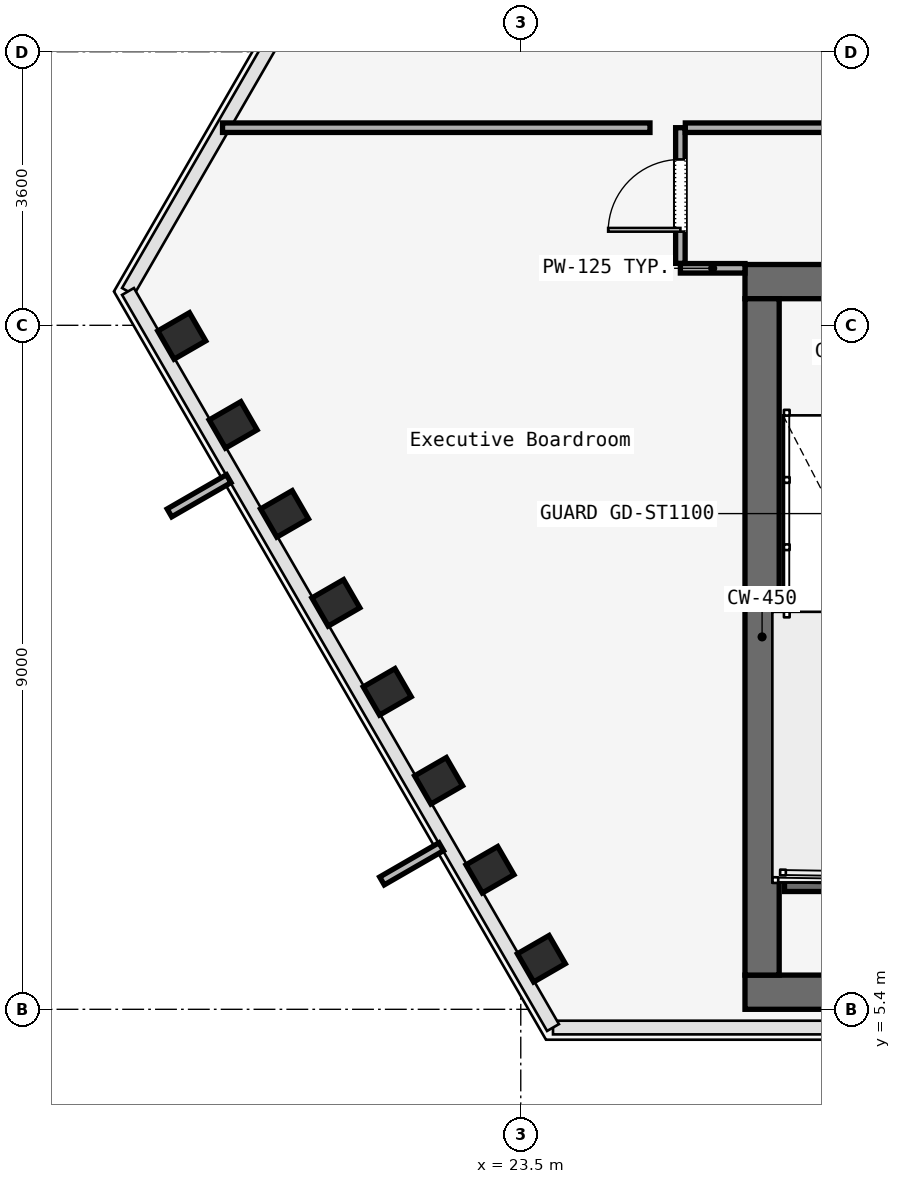
"""IFC4 building model, lengths in metres.
Left out: names, types, materials, properties, quantities, classifications, styles, units other than length and angle.
Written with IfcOpenShell. Run it as: python <this file> out.ifc"""

import sys

from ifc_helpers import new_model, si_unit, direction, frame, frame_2d, origin, origin_2d, place, context, subcontext, project, spatial, rectangle, i_section, extrude, element, fill, save


model = new_model("IFC4")
c1 = context("Model", 3, precision=1e-05, world=origin(), true_north=direction((0.0, 1.0)))
c2 = subcontext(c1, "Body", "Model", "MODEL_VIEW")
j1 = project(units=[si_unit("LENGTHUNIT", "METRE"), si_unit("PLANEANGLEUNIT", "RADIAN")], contexts=[c1])
p1 = place(None, origin())
s1 = spatial("IfcSite", under=j1, at=p1, CompositionType="ELEMENT")
p2 = place(p1, origin())
s2 = spatial("IfcBuilding", under=s1, at=p2, CompositionType="ELEMENT")
p3 = place(p2, frame((0.0, 0.0, 157.4)))
s3 = spatial("IfcBuildingStorey", under=s2, at=p3, CompositionType="ELEMENT", Elevation=157.4)
p4 = place(p3, frame((26.45, 14.975, 0.0), z_axis=(0.0, 0.0, 1.0), x_axis=(1.0, 0.0, 0.0)))
e1 = element("IfcWall", 1, at=p4, inside=s3, PredefinedType="SOLIDWALL", context=c2, shape_type="SweptSolid", body=[
    extrude(rectangle(XDim=31.1, YDim=0.45, at=frame_2d((15.55, 0.0))), origin(), (0.0, 0.0, 1.0), 3.58),
])
p5 = place(p4, frame((1.65, 0.0, 0.0)))
e2 = element("IfcOpeningElement", 2, at=p5, cuts=e1, PredefinedType="OPENING", context=c2, shape_type="SweptSolid", body=[
    extrude(rectangle(XDim=1.1, YDim=2.2, at=frame_2d((0.55, 1.1))), frame((0.0, 0.225, 0.0), z_axis=(0.0, -1.0, 0.0), x_axis=(1.0, 0.0, 0.0)), (0.0, 0.0, 1.0), 0.45),
])
p6 = place(p4, frame((13.65, 0.0, 0.0)))
e3 = element("IfcOpeningElement", 3, at=p6, cuts=e1, PredefinedType="OPENING", context=c2, shape_type="SweptSolid", body=[
    extrude(rectangle(XDim=1.1, YDim=2.2, at=frame_2d((0.55, 1.1))), frame((0.0, 0.225, 0.0), z_axis=(0.0, -1.0, 0.0), x_axis=(1.0, 0.0, 0.0)), (0.0, 0.0, 1.0), 0.45),
])
p7 = place(p4, frame((25.55, 0.0, 0.0)))
e4 = element("IfcOpeningElement", 4, at=p7, cuts=e1, PredefinedType="OPENING", context=c2, shape_type="SweptSolid", body=[
    extrude(rectangle(XDim=1.1, YDim=2.2, at=frame_2d((0.55, 1.1))), frame((0.0, 0.225, 0.0), z_axis=(0.0, -1.0, 0.0), x_axis=(1.0, 0.0, 0.0)), (0.0, 0.0, 1.0), 0.45),
])
p8 = place(p4, frame((10.7, 0.0, 0.0)))
e5 = element("IfcOpeningElement", 5, at=p8, cuts=e1, PredefinedType="OPENING", context=c2, shape_type="SweptSolid", body=[
    extrude(rectangle(XDim=1.4, YDim=2.2, at=frame_2d((0.7, 1.1))), frame((0.0, 0.225, 0.0), z_axis=(0.0, -1.0, 0.0), x_axis=(1.0, 0.0, 0.0)), (0.0, 0.0, 1.0), 0.45),
])
p9 = place(p4, frame((19.35, 0.0, 0.0)))
e6 = element("IfcOpeningElement", 6, at=p9, cuts=e1, PredefinedType="OPENING", context=c2, shape_type="SweptSolid", body=[
    extrude(rectangle(XDim=1.1, YDim=2.2, at=frame_2d((0.55, 1.1))), frame((0.0, 0.225, 0.0), z_axis=(0.0, -1.0, 0.0), x_axis=(1.0, 0.0, 0.0)), (0.0, 0.0, 1.0), 0.45),
])
p10 = place(p4, frame((21.4, 0.0, 0.0)))
e7 = element("IfcOpeningElement", 7, at=p10, cuts=e1, PredefinedType="OPENING", context=c2, shape_type="SweptSolid", body=[
    extrude(rectangle(XDim=0.9, YDim=2.1, at=frame_2d((0.45, 1.05))), frame((0.0, 0.225, 0.0), z_axis=(0.0, -1.0, 0.0), x_axis=(1.0, 0.0, 0.0)), (0.0, 0.0, 1.0), 0.45),
])
p11 = place(p4, frame((23.35, 0.0, 0.0)))
e8 = element("IfcOpeningElement", 8, at=p11, cuts=e1, PredefinedType="OPENING", context=c2, shape_type="SweptSolid", body=[
    extrude(rectangle(XDim=1.3, YDim=2.3, at=frame_2d((0.65, 1.15))), frame((0.0, 0.225, 0.0), z_axis=(0.0, -1.0, 0.0), x_axis=(1.0, 0.0, 0.0)), (0.0, 0.0, 1.0), 0.45),
])
p12 = place(p3, frame((26.45, 5.625, 0.0), z_axis=(0.0, 0.0, 1.0), x_axis=(1.0, 0.0, 0.0)))
e9 = element("IfcWall", 9, at=p12, inside=s3, PredefinedType="SOLIDWALL", context=c2, shape_type="SweptSolid", body=[
    extrude(rectangle(XDim=31.1, YDim=0.45, at=frame_2d((15.55, 0.0))), origin(), (0.0, 0.0, 1.0), 3.58),
])
p13 = place(p3, frame((26.675, 5.85, 0.0), z_axis=(0.0, 0.0, 1.0), x_axis=(0.0, 1.0, 0.0)))
e10 = element("IfcWall", 10, at=p13, inside=s3, PredefinedType="SOLIDWALL", context=c2, shape_type="SweptSolid", body=[
    extrude(rectangle(XDim=8.9, YDim=0.45, at=frame_2d((4.45, 0.0))), origin(), (0.0, 0.0, 1.0), 3.58),
])
p14 = place(p3, frame((19.04, 14.26, 0.0), z_axis=(-0.012644712092, -0.129016634603, 0.991561808084), x_axis=(-0.413855538936, 0.903393439942, 0.112267027934)))
e11 = element("IfcColumn", 11, at=p14, inside=s3, PredefinedType="COLUMN", context=c2, shape_type="SweptSolid", body=[
    extrude(i_section(OverallWidth=0.428, OverallDepth=0.481, WebThickness=0.051, FlangeThickness=0.065, FilletRadius=0.015, at=origin_2d()), origin(), (0.0, 0.0, 1.0), 3.611),
])
p15 = place(p3, frame((19.716, 13.089, 0.0), z_axis=(-0.022627554317, -0.112053816885, 0.993444480536), x_axis=(-0.319810446027, 0.942295192889, 0.099000242776)))
e12 = element("IfcColumn", 12, at=p15, inside=s3, PredefinedType="COLUMN", context=c2, shape_type="SweptSolid", body=[
    extrude(i_section(OverallWidth=0.428, OverallDepth=0.481, WebThickness=0.051, FlangeThickness=0.065, FilletRadius=0.015, at=origin_2d()), origin(), (0.0, 0.0, 1.0), 3.604),
])
p16 = place(p3, frame((20.392, 11.919, 0.0), z_axis=(-0.032635548497, -0.094989122444, 0.994943208224), x_axis=(-0.192895682361, 0.977356253584, 0.086982810407)))
e13 = element("IfcColumn", 13, at=p16, inside=s3, PredefinedType="COLUMN", context=c2, shape_type="SweptSolid", body=[
    extrude(i_section(OverallWidth=0.428, OverallDepth=0.481, WebThickness=0.051, FlangeThickness=0.065, FilletRadius=0.015, at=origin_2d()), origin(), (0.0, 0.0, 1.0), 3.598),
])
p17 = place(p3, frame((21.067, 10.748, 0.0), z_axis=(-0.042657147183, -0.077774575675, 0.996057971793), x_axis=(-0.023569695175, 0.996766312557, 0.076820489587)))
e14 = element("IfcColumn", 14, at=p17, inside=s3, PredefinedType="COLUMN", context=c2, shape_type="SweptSolid", body=[
    extrude(i_section(OverallWidth=0.428, OverallDepth=0.481, WebThickness=0.051, FlangeThickness=0.065, FilletRadius=0.015, at=origin_2d()), origin(), (0.0, 0.0, 1.0), 3.594),
])
p18 = place(p3, frame((21.743, 9.577, 0.0), z_axis=(-0.052679977331, -0.06056498039, 0.996773145274), x_axis=(0.189267023652, 0.979461852811, 0.06951598842)))
e15 = element("IfcColumn", 15, at=p18, inside=s3, PredefinedType="COLUMN", context=c2, shape_type="SweptSolid", body=[
    extrude(i_section(OverallWidth=0.428, OverallDepth=0.481, WebThickness=0.051, FlangeThickness=0.065, FilletRadius=0.015, at=origin_2d()), origin(), (0.0, 0.0, 1.0), 3.592),
])
p19 = place(p3, frame((22.419, 8.407, 0.0), z_axis=(-0.062692448917, -0.043245550446, 0.99709552161), x_axis=(0.4268946115, 0.901892787466, 0.065957490769)))
e16 = element("IfcColumn", 16, at=p19, inside=s3, PredefinedType="COLUMN", context=c2, shape_type="SweptSolid", body=[
    extrude(i_section(OverallWidth=0.428, OverallDepth=0.481, WebThickness=0.051, FlangeThickness=0.065, FilletRadius=0.015, at=origin_2d()), origin(), (0.0, 0.0, 1.0), 3.591),
])
p20 = place(p3, frame((23.095, 7.236, 0.0), z_axis=(-0.072682152579, -0.02597248109, 0.997016918072), x_axis=(0.64483596094, 0.761392562789, 0.066842716942)))
e17 = element("IfcColumn", 17, at=p20, inside=s3, PredefinedType="COLUMN", context=c2, shape_type="SweptSolid", body=[
    extrude(i_section(OverallWidth=0.428, OverallDepth=0.481, WebThickness=0.051, FlangeThickness=0.065, FilletRadius=0.015, at=origin_2d()), origin(), (0.0, 0.0, 1.0), 3.591),
])
p21 = place(p3, frame((23.771, 6.065, 0.0), z_axis=(-0.082637441478, -0.008630719628, 0.996542304142), x_axis=(0.80642429623, 0.586943163695, 0.071955382297)))
e18 = element("IfcColumn", 18, at=p21, inside=s3, PredefinedType="COLUMN", context=c2, shape_type="SweptSolid", body=[
    extrude(i_section(OverallWidth=0.428, OverallDepth=0.481, WebThickness=0.051, FlangeThickness=0.065, FilletRadius=0.015, at=origin_2d()), origin(), (0.0, 0.0, 1.0), 3.593),
])
p22 = place(p3, frame((26.97, 7.05, 0.0), z_axis=(0.0, 0.0, 1.0), x_axis=(1.0, 0.0, 0.0)))
e19 = element("IfcWall", 19, at=p22, inside=s3, PredefinedType="SOLIDWALL", context=c2, shape_type="SweptSolid", body=[
    extrude(rectangle(XDim=3.115, YDim=0.2, at=frame_2d((1.558, 0.0))), origin(), (0.0, 0.0, 1.0), 3.8),
])
p23 = place(p3, frame((26.45, 15.15, 0.0), z_axis=(0.0, 0.0, 1.0), x_axis=(-1.0, 0.0, 0.0)))
e20 = element("IfcWall", 20, at=p23, inside=s3, PredefinedType="PARTITIONING", context=c2, shape_type="SweptSolid", body=[
    extrude(rectangle(XDim=0.85, YDim=0.125, at=frame_2d((0.425, 0.0))), origin(), (0.0, 0.0, 1.0), 3.01),
])
p24 = place(p3, frame((25.6, 15.215, 0.0), z_axis=(0.0, 0.0, 1.0), x_axis=(0.0, 1.0, 0.0)))
e21 = element("IfcWall", 21, at=p24, inside=s3, PredefinedType="PARTITIONING", context=c2, shape_type="SweptSolid", body=[
    extrude(rectangle(XDim=1.785, YDim=0.125, at=frame_2d((0.893, 0.0))), origin(), (0.0, 0.0, 1.0), 3.01),
])
p25 = place(p24, frame((0.417, 0.0, 0.0)))
e22 = element("IfcOpeningElement", 22, at=p25, cuts=e21, PredefinedType="OPENING", context=c2, shape_type="SweptSolid", body=[
    extrude(rectangle(XDim=0.95, YDim=2.2, at=frame_2d((0.475, 1.1))), frame((0.0, 0.062, 0.0), z_axis=(0.0, -1.0, 0.0), x_axis=(1.0, 0.0, 0.0)), (0.0, 0.0, 1.0), 0.125),
])
p26 = place(p3, frame((25.665, 17.0, 0.0), z_axis=(0.0, 0.0, 1.0), x_axis=(1.0, 0.0, 0.0)))
e23 = element("IfcWall", 23, at=p26, inside=s3, PredefinedType="PARTITIONING", context=c2, shape_type="SweptSolid", body=[
    extrude(rectangle(XDim=5.735, YDim=0.125, at=frame_2d((2.867, 0.0))), origin(), (0.0, 0.0, 1.0), 3.01),
])
p27 = place(p26, frame((2.167, 0.0, 0.0)))
e24 = element("IfcOpeningElement", 24, at=p27, cuts=e23, PredefinedType="OPENING", context=c2, shape_type="SweptSolid", body=[
    extrude(rectangle(XDim=1.4, YDim=2.2, at=frame_2d((0.7, 1.1))), frame((0.0, 0.062, 0.0), z_axis=(0.0, -1.0, 0.0), x_axis=(1.0, 0.0, 0.0)), (0.0, 0.0, 1.0), 0.125),
])
p28 = place(p3, frame((19.576, 17.0, 0.0), z_axis=(0.0, 0.0, 1.0), x_axis=(1.0, 0.0, 0.0)))
e25 = element("IfcWall", 25, at=p28, inside=s3, PredefinedType="PARTITIONING", context=c2, shape_type="SweptSolid", body=[
    extrude(rectangle(XDim=5.624, YDim=0.125, at=frame_2d((2.812, 0.0))), origin(), (0.0, 0.0, 1.0), 3.01),
])
p29 = place(p25, origin())
e26 = element("IfcDoor", 26, at=p29, inside=s3, OperationType="SINGLE_SWING_RIGHT", PredefinedType="DOOR", context=c2, shape_type="SweptSolid", body=[
    extrude(rectangle(XDim=0.95, YDim=2.2, at=frame_2d((0.475, 1.1))), frame((0.0, 0.025, 0.0), z_axis=(0.0, -1.0, 0.0), x_axis=(1.0, 0.0, 0.0)), (0.0, 0.0, 1.0), 0.05),
])
fill(e22, e26)
save(model, sys.argv[1])
